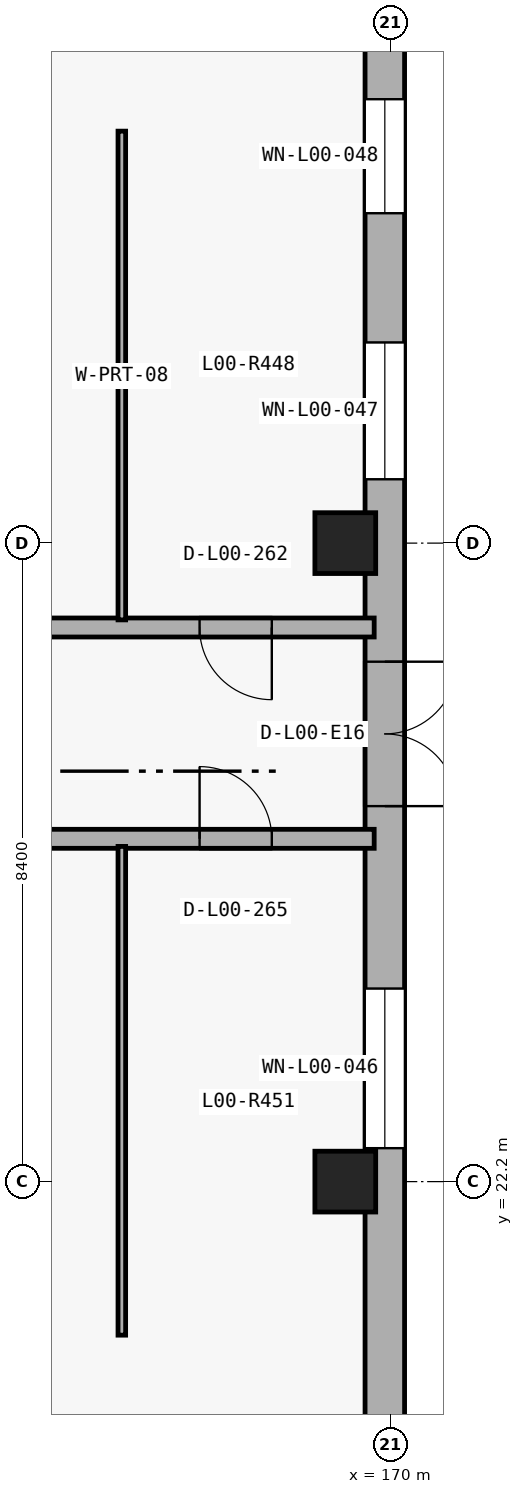
"""IFC4 building model, lengths in metres.
Left out: names, types, materials, properties, quantities, classifications, styles, units other than length and angle.
Written with IfcOpenShell. Run it as: python <this file> out.ifc"""

import sys

from ifc_helpers import new_model, si_unit, direction, frame, frame_2d, origin_with_axes, origin_2d_with_axis, place, context, subcontext, project, spatial, rectangle, circle, extrude, element, fill, save


model = new_model("IFC4")
c1 = context("Model", 3, precision=1e-05, world=origin_with_axes(), true_north=direction((0.0, 1.0)))
c2 = subcontext(c1, "Body", "Model", "MODEL_VIEW")
j1 = project(units=[si_unit("LENGTHUNIT", "METRE"), si_unit("PLANEANGLEUNIT", "RADIAN")], contexts=[c1])
p1 = place(None, origin_with_axes())
s1 = spatial("IfcSite", under=j1, at=p1, CompositionType="ELEMENT")
p2 = place(p1, origin_with_axes())
s2 = spatial("IfcBuilding", under=s1, at=p2, CompositionType="ELEMENT")
p3 = place(p2, origin_with_axes())
s3 = spatial("IfcBuildingStorey", under=s2, at=p3, CompositionType="ELEMENT", Elevation=0.0)
p4 = place(None, frame((169.92, 6.34, 0.0), z_axis=(0.0, 0.0, 1.0), x_axis=(0.0, 1.0, 0.0)))
e1 = element("IfcWall", 1, at=p4, inside=s3, PredefinedType="SOLIDWALL", context=c2, shape_type="SweptSolid", body=[
    extrude(rectangle(XDim=55.2, YDim=0.52, at=frame_2d((27.6, 0.0), x_axis=(1.0, 0.0))), origin_with_axes(), (0.0, 0.0, 1.0), 5.1),
])
p5 = place(None, frame((169.92, 28.09, 0.0), z_axis=(0.0, 0.0, 1.0), x_axis=(0.0, 1.0, 0.0)))
e2 = element("IfcOpeningElement", 2, at=p5, cuts=e1, PredefinedType="OPENING", context=c2, shape_type="SweptSolid", body=[
    extrude(rectangle(XDim=1.9, YDim=2.4, at=frame_2d((0.0, 1.2), x_axis=(1.0, 0.0))), frame((0.0, 0.27, 0.0), z_axis=(0.0, -1.0, 0.0), x_axis=(1.0, 0.0, 0.0)), (0.0, 0.0, 1.0), 0.54),
])
p6 = place(None, frame((169.92, 42.06, 0.0), z_axis=(0.0, 0.0, 1.0), x_axis=(0.0, 1.0, 0.0)))
e3 = element("IfcOpeningElement", 3, at=p6, cuts=e1, PredefinedType="OPENING", context=c2, shape_type="SweptSolid", body=[
    extrude(rectangle(XDim=1.04, YDim=2.24, at=frame_2d((0.0, 1.12), x_axis=(1.0, 0.0))), frame((0.0, 0.27, 0.0), z_axis=(0.0, -1.0, 0.0), x_axis=(1.0, 0.0, 0.0)), (0.0, 0.0, 1.0), 0.54),
])
p7 = place(None, frame((169.92, 10.44, 0.0), z_axis=(0.0, 0.0, 1.0), x_axis=(0.0, 1.0, 0.0)))
e4 = element("IfcOpeningElement", 4, at=p7, cuts=e1, PredefinedType="OPENING", context=c2, shape_type="SweptSolid", body=[
    extrude(rectangle(XDim=4.2, YDim=4.52, at=frame_2d((0.0, 2.26), x_axis=(1.0, 0.0))), frame((0.0, 0.27, 0.0), z_axis=(0.0, -1.0, 0.0), x_axis=(1.0, 0.0, 0.0)), (0.0, 0.0, 1.0), 0.54),
])
p8 = place(None, frame((169.92, 15.14, 1.0), z_axis=(0.0, 0.0, 1.0), x_axis=(0.0, 1.0, 0.0)))
e5 = element("IfcOpeningElement", 5, at=p8, cuts=e1, PredefinedType="OPENING", context=c2, shape_type="SweptSolid", body=[
    extrude(rectangle(XDim=1.5, YDim=3.8, at=frame_2d((0.0, 1.9), x_axis=(1.0, 0.0))), frame((0.0, 0.27, 0.0), z_axis=(0.0, -1.0, 0.0), x_axis=(1.0, 0.0, 0.0)), (0.0, 0.0, 1.0), 0.54),
])
p9 = place(None, frame((169.92, 17.94, 1.1), z_axis=(0.0, 0.0, 1.0), x_axis=(0.0, 1.0, 0.0)))
e6 = element("IfcOpeningElement", 6, at=p9, cuts=e1, PredefinedType="OPENING", context=c2, shape_type="SweptSolid", body=[
    extrude(rectangle(XDim=1.2, YDim=3.4, at=frame_2d((0.0, 1.7), x_axis=(1.0, 0.0))), frame((0.0, 0.27, 0.0), z_axis=(0.0, -1.0, 0.0), x_axis=(1.0, 0.0, 0.0)), (0.0, 0.0, 1.0), 0.54),
])
p10 = place(None, frame((169.92, 23.69, 0.85), z_axis=(0.0, 0.0, 1.0), x_axis=(0.0, 1.0, 0.0)))
e7 = element("IfcOpeningElement", 7, at=p10, cuts=e1, PredefinedType="OPENING", context=c2, shape_type="SweptSolid", body=[
    extrude(rectangle(XDim=2.1, YDim=3.3, at=frame_2d((0.0, 1.65), x_axis=(1.0, 0.0))), frame((0.0, 0.27, 0.0), z_axis=(0.0, -1.0, 0.0), x_axis=(1.0, 0.0, 0.0)), (0.0, 0.0, 1.0), 0.54),
])
p11 = place(None, frame((169.92, 32.34, 0.9), z_axis=(0.0, 0.0, 1.0), x_axis=(0.0, 1.0, 0.0)))
e8 = element("IfcOpeningElement", 8, at=p11, cuts=e1, PredefinedType="OPENING", context=c2, shape_type="SweptSolid", body=[
    extrude(rectangle(XDim=1.8, YDim=3.0, at=frame_2d((0.0, 1.5), x_axis=(1.0, 0.0))), frame((0.0, 0.27, 0.0), z_axis=(0.0, -1.0, 0.0), x_axis=(1.0, 0.0, 0.0)), (0.0, 0.0, 1.0), 0.54),
])
p12 = place(None, frame((169.92, 35.69, 0.9), z_axis=(0.0, 0.0, 1.0), x_axis=(0.0, 1.0, 0.0)))
e9 = element("IfcOpeningElement", 9, at=p12, cuts=e1, PredefinedType="OPENING", context=c2, shape_type="SweptSolid", body=[
    extrude(rectangle(XDim=1.5, YDim=2.7, at=frame_2d((0.0, 1.35), x_axis=(1.0, 0.0))), frame((0.0, 0.27, 0.0), z_axis=(0.0, -1.0, 0.0), x_axis=(1.0, 0.0, 0.0)), (0.0, 0.0, 1.0), 0.54),
])
p13 = place(None, frame((169.92, 40.465, 0.95), z_axis=(0.0, 0.0, 1.0), x_axis=(0.0, 1.0, 0.0)))
e10 = element("IfcOpeningElement", 10, at=p13, cuts=e1, PredefinedType="OPENING", context=c2, shape_type="SweptSolid", body=[
    extrude(rectangle(XDim=1.35, YDim=2.5, at=frame_2d((0.0, 1.25), x_axis=(1.0, 0.0))), frame((0.0, 0.27, 0.0), z_axis=(0.0, -1.0, 0.0), x_axis=(1.0, 0.0, 0.0)), (0.0, 0.0, 1.0), 0.54),
])
p14 = place(None, frame((169.92, 44.49, 2.7), z_axis=(0.0, 0.0, 1.0), x_axis=(0.0, 1.0, 0.0)))
e11 = element("IfcOpeningElement", 11, at=p14, cuts=e1, PredefinedType="OPENING", context=c2, shape_type="SweptSolid", body=[
    extrude(rectangle(XDim=2.4, YDim=1.4, at=frame_2d((0.0, 0.7), x_axis=(1.0, 0.0))), frame((0.0, 0.27, 0.0), z_axis=(0.0, -1.0, 0.0), x_axis=(1.0, 0.0, 0.0)), (0.0, 0.0, 1.0), 0.54),
])
p15 = place(None, frame((169.92, 49.19, 2.7), z_axis=(0.0, 0.0, 1.0), x_axis=(0.0, 1.0, 0.0)))
e12 = element("IfcOpeningElement", 12, at=p15, cuts=e1, PredefinedType="OPENING", context=c2, shape_type="SweptSolid", body=[
    extrude(rectangle(XDim=2.1, YDim=1.3, at=frame_2d((0.0, 0.65), x_axis=(1.0, 0.0))), frame((0.0, 0.27, 0.0), z_axis=(0.0, -1.0, 0.0), x_axis=(1.0, 0.0, 0.0)), (0.0, 0.0, 1.0), 0.54),
])
p16 = place(None, frame((169.92, 52.99, 2.75), z_axis=(0.0, 0.0, 1.0), x_axis=(0.0, 1.0, 0.0)))
e13 = element("IfcOpeningElement", 13, at=p16, cuts=e1, PredefinedType="OPENING", context=c2, shape_type="SweptSolid", body=[
    extrude(rectangle(XDim=1.8, YDim=1.2, at=frame_2d((0.0, 0.6), x_axis=(1.0, 0.0))), frame((0.0, 0.27, 0.0), z_axis=(0.0, -1.0, 0.0), x_axis=(1.0, 0.0, 0.0)), (0.0, 0.0, 1.0), 0.54),
])
p17 = place(None, frame((141.755, 29.49, 0.0), z_axis=(0.0, 0.0, 1.0), x_axis=(1.0, 0.0, 0.0)))
e14 = element("IfcWall", 14, at=p17, inside=s3, PredefinedType="PARTITIONING", context=c2, shape_type="SweptSolid", body=[
    extrude(rectangle(XDim=28.025, YDim=0.25, at=frame_2d((14.012, 0.0), x_axis=(1.0, 0.0))), origin_with_axes(), (0.0, 0.0, 1.0), 5.08),
])
p18 = place(None, frame((147.957, 29.49, 0.0), z_axis=(0.0, 0.0, 1.0), x_axis=(1.0, 0.0, 0.0)))
e15 = element("IfcOpeningElement", 15, at=p18, cuts=e14, PredefinedType="OPENING", context=c2, shape_type="SweptSolid", body=[
    extrude(rectangle(XDim=0.93, YDim=2.1, at=frame_2d((0.0, 1.05), x_axis=(1.0, 0.0))), frame((0.0, 0.135, 0.0), z_axis=(0.0, -1.0, 0.0), x_axis=(1.0, 0.0, 0.0)), (0.0, 0.0, 1.0), 0.27),
])
p19 = place(None, frame((159.498, 29.49, 0.0), z_axis=(0.0, 0.0, 1.0), x_axis=(1.0, 0.0, 0.0)))
e16 = element("IfcOpeningElement", 16, at=p19, cuts=e14, PredefinedType="OPENING", context=c2, shape_type="SweptSolid", body=[
    extrude(rectangle(XDim=1.08, YDim=2.18, at=frame_2d((0.0, 1.09), x_axis=(1.0, 0.0))), frame((0.0, 0.135, 0.0), z_axis=(0.0, -1.0, 0.0), x_axis=(1.0, 0.0, 0.0)), (0.0, 0.0, 1.0), 0.27),
])
p20 = place(None, frame((167.958, 29.49, 0.0), z_axis=(0.0, 0.0, 1.0), x_axis=(1.0, 0.0, 0.0)))
e17 = element("IfcOpeningElement", 17, at=p20, cuts=e14, PredefinedType="OPENING", context=c2, shape_type="SweptSolid", body=[
    extrude(rectangle(XDim=0.95, YDim=2.1, at=frame_2d((0.0, 1.05), x_axis=(1.0, 0.0))), frame((0.0, 0.135, 0.0), z_axis=(0.0, -1.0, 0.0), x_axis=(1.0, 0.0, 0.0)), (0.0, 0.0, 1.0), 0.27),
])
p21 = place(None, frame((121.94, 26.71, 0.0), z_axis=(0.0, 0.0, 1.0), x_axis=(1.0, 0.0, 0.0)))
e18 = element("IfcWall", 18, at=p21, inside=s3, PredefinedType="PARTITIONING", context=c2, shape_type="SweptSolid", body=[
    extrude(rectangle(XDim=47.84, YDim=0.25, at=frame_2d((23.92, 0.0), x_axis=(1.0, 0.0))), origin_with_axes(), (0.0, 0.0, 1.0), 5.08),
])
p22 = place(None, frame((130.724, 26.71, 0.0), z_axis=(0.0, 0.0, 1.0), x_axis=(1.0, 0.0, 0.0)))
e19 = element("IfcOpeningElement", 19, at=p22, cuts=e18, PredefinedType="OPENING", context=c2, shape_type="SweptSolid", body=[
    extrude(rectangle(XDim=1.08, YDim=2.18, at=frame_2d((0.0, 1.09), x_axis=(1.0, 0.0))), frame((0.0, 0.135, 0.0), z_axis=(0.0, -1.0, 0.0), x_axis=(1.0, 0.0, 0.0)), (0.0, 0.0, 1.0), 0.27),
])
p23 = place(None, frame((152.822, 26.71, 0.0), z_axis=(0.0, 0.0, 1.0), x_axis=(1.0, 0.0, 0.0)))
e20 = element("IfcOpeningElement", 20, at=p23, cuts=e18, PredefinedType="OPENING", context=c2, shape_type="SweptSolid", body=[
    extrude(rectangle(XDim=0.93, YDim=2.1, at=frame_2d((0.0, 1.05), x_axis=(1.0, 0.0))), frame((0.0, 0.135, 0.0), z_axis=(0.0, -1.0, 0.0), x_axis=(1.0, 0.0, 0.0)), (0.0, 0.0, 1.0), 0.27),
])
p24 = place(None, frame((167.958, 26.71, 0.0), z_axis=(0.0, 0.0, 1.0), x_axis=(1.0, 0.0, 0.0)))
e21 = element("IfcOpeningElement", 21, at=p24, cuts=e18, PredefinedType="OPENING", context=c2, shape_type="SweptSolid", body=[
    extrude(rectangle(XDim=0.95, YDim=2.1, at=frame_2d((0.0, 1.05), x_axis=(1.0, 0.0))), frame((0.0, 0.135, 0.0), z_axis=(0.0, -1.0, 0.0), x_axis=(1.0, 0.0, 0.0)), (0.0, 0.0, 1.0), 0.27),
])
p25 = place(None, frame((166.46, 29.59, 0.0), z_axis=(0.0, 0.0, 1.0), x_axis=(0.0, 1.0, 0.0)))
e22 = element("IfcWall", 22, at=p25, inside=s3, PredefinedType="PARTITIONING", context=c2, shape_type="SweptSolid", body=[
    extrude(rectangle(XDim=6.43, YDim=0.1, at=frame_2d((3.215, 0.0), x_axis=(1.0, 0.0))), origin_with_axes(), (0.0, 0.0, 1.0), 5.08),
])
p26 = place(None, frame((166.46, 20.18, 0.0), z_axis=(0.0, 0.0, 1.0), x_axis=(0.0, 1.0, 0.0)))
e23 = element("IfcWall", 23, at=p26, inside=s3, PredefinedType="PARTITIONING", context=c2, shape_type="SweptSolid", body=[
    extrude(rectangle(XDim=6.43, YDim=0.1, at=frame_2d((3.215, 0.0), x_axis=(1.0, 0.0))), origin_with_axes(), (0.0, 0.0, 1.0), 5.08),
])
for number, where, z_axis, x_axis in (
    (24, (169.4, 22.2, 0.0), (0.0, 0.0, 1.0), (1.0, 0.0, 0.0)),
    (25, (169.4, 30.6, 0.0), (0.0, 0.0, 1.0), (1.0, 0.0, 0.0)),
):
    element("IfcColumn", number, at=place(None, frame(where, z_axis=z_axis, x_axis=x_axis)), inside=s3, PredefinedType="COLUMN", context=c2, shape_type="SweptSolid", body=[
        extrude(circle(Radius=0.4, at=origin_2d_with_axis()), origin_with_axes(), (0.0, 0.0, 1.0), 5.4),
    ])
p27 = place(None, frame((169.92, 28.09, 0.0), z_axis=(0.0, 0.0, 1.0), x_axis=(0.0, -1.0, 0.0)))
e26 = element("IfcDoor", 26, at=p27, inside=s3, OperationType="DOUBLE_DOOR_SINGLE_SWING", PredefinedType="DOOR", context=c2, shape_type="SweptSolid", body=[
    extrude(rectangle(XDim=1.9, YDim=2.4, at=frame_2d((0.0, 1.2), x_axis=(1.0, 0.0))), frame((0.0, 0.04, 0.0), z_axis=(0.0, -1.0, 0.0), x_axis=(1.0, 0.0, 0.0)), (0.0, 0.0, 1.0), 0.08),
])
fill(e2, e26)
p28 = place(None, frame((167.958, 29.49, 0.0), z_axis=(0.0, 0.0, 1.0), x_axis=(-1.0, 0.0, 0.0)))
e27 = element("IfcDoor", 27, at=p28, inside=s3, OperationType="SINGLE_SWING_RIGHT", PredefinedType="DOOR", context=c2, shape_type="SweptSolid", body=[
    extrude(rectangle(XDim=0.95, YDim=2.1, at=frame_2d((0.0, 1.05), x_axis=(1.0, 0.0))), frame((0.0, 0.04, 0.0), z_axis=(0.0, -1.0, 0.0), x_axis=(1.0, 0.0, 0.0)), (0.0, 0.0, 1.0), 0.08),
])
fill(e17, e27)
p29 = place(None, frame((167.958, 26.71, 0.0), z_axis=(0.0, 0.0, 1.0), x_axis=(1.0, 0.0, 0.0)))
e28 = element("IfcDoor", 28, at=p29, inside=s3, OperationType="SINGLE_SWING_LEFT", PredefinedType="DOOR", context=c2, shape_type="SweptSolid", body=[
    extrude(rectangle(XDim=0.95, YDim=2.1, at=frame_2d((0.0, 1.05), x_axis=(1.0, 0.0))), frame((0.0, 0.04, 0.0), z_axis=(0.0, -1.0, 0.0), x_axis=(1.0, 0.0, 0.0)), (0.0, 0.0, 1.0), 0.08),
])
fill(e21, e28)
p30 = place(None, frame((169.92, 23.69, 0.85), z_axis=(0.0, 0.0, 1.0), x_axis=(0.0, 1.0, 0.0)))
e29 = element("IfcWindow", 29, at=p30, inside=s3, PartitioningType="SINGLE_PANEL", PredefinedType="WINDOW", context=c2, shape_type="SweptSolid", body=[
    extrude(rectangle(XDim=2.1, YDim=3.3, at=frame_2d((0.0, 1.65), x_axis=(1.0, 0.0))), frame((0.0, 0.03, 0.0), z_axis=(0.0, -1.0, 0.0), x_axis=(1.0, 0.0, 0.0)), (0.0, 0.0, 1.0), 0.06),
])
fill(e7, e29)
p31 = place(None, frame((169.92, 32.34, 0.9), z_axis=(0.0, 0.0, 1.0), x_axis=(0.0, 1.0, 0.0)))
e30 = element("IfcWindow", 30, at=p31, inside=s3, PartitioningType="SINGLE_PANEL", PredefinedType="WINDOW", context=c2, shape_type="SweptSolid", body=[
    extrude(rectangle(XDim=1.8, YDim=3.0, at=frame_2d((0.0, 1.5), x_axis=(1.0, 0.0))), frame((0.0, 0.03, 0.0), z_axis=(0.0, -1.0, 0.0), x_axis=(1.0, 0.0, 0.0)), (0.0, 0.0, 1.0), 0.06),
])
fill(e8, e30)
p32 = place(None, frame((169.92, 35.69, 0.9), z_axis=(0.0, 0.0, 1.0), x_axis=(0.0, 1.0, 0.0)))
e31 = element("IfcWindow", 31, at=p32, inside=s3, PartitioningType="SINGLE_PANEL", PredefinedType="WINDOW", context=c2, shape_type="SweptSolid", body=[
    extrude(rectangle(XDim=1.5, YDim=2.7, at=frame_2d((0.0, 1.35), x_axis=(1.0, 0.0))), frame((0.0, 0.03, 0.0), z_axis=(0.0, -1.0, 0.0), x_axis=(1.0, 0.0, 0.0)), (0.0, 0.0, 1.0), 0.06),
])
fill(e9, e31)
save(model, sys.argv[1])
